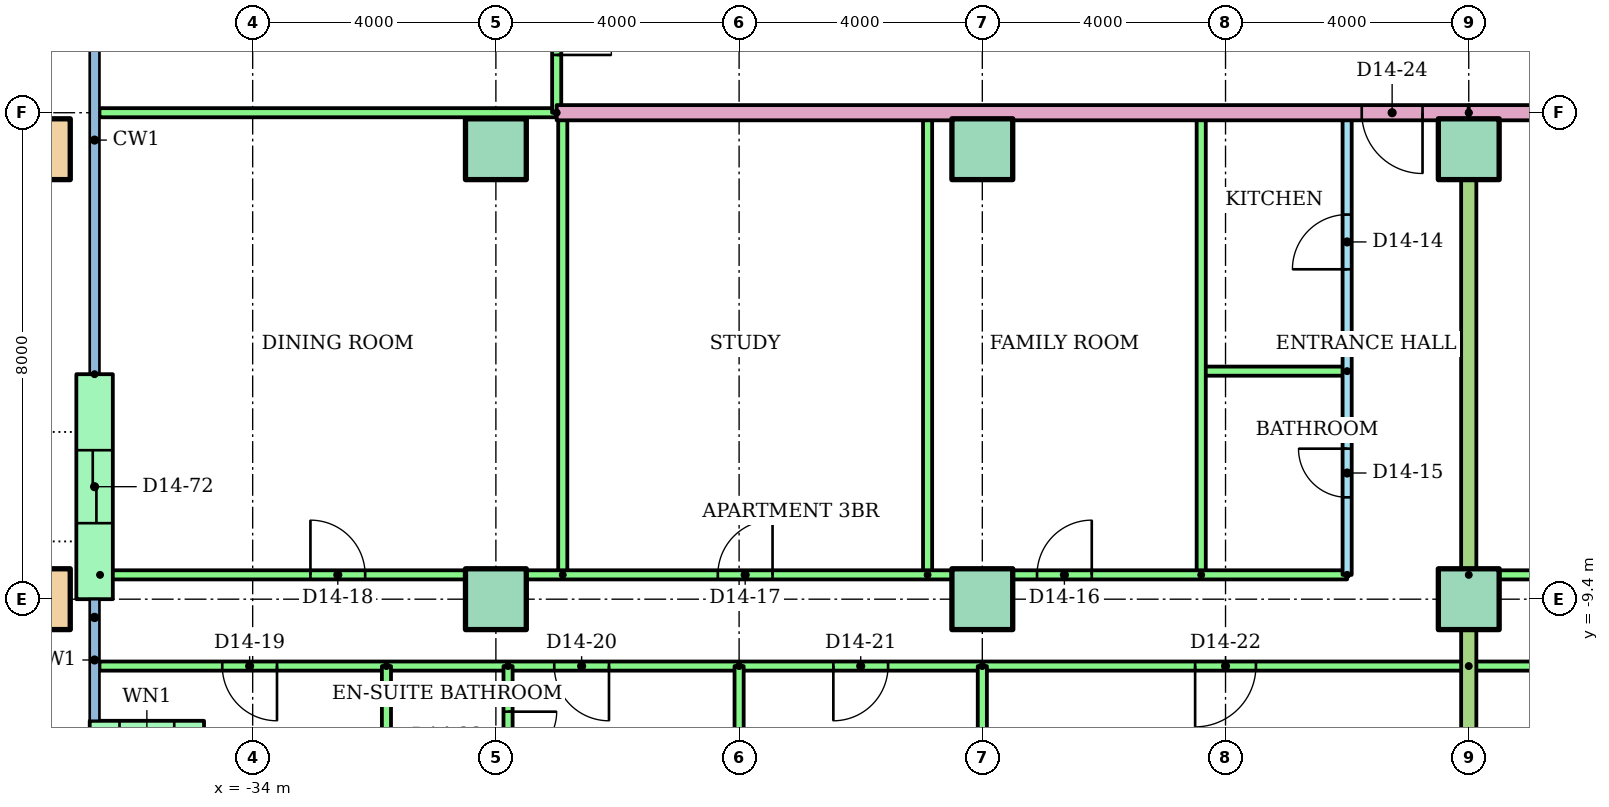
"""IFC4 building model, lengths in metres.
Left out: names, types, materials, properties, quantities, classifications, styles, units other than length and angle.
Written with IfcOpenShell. Run it as: python <this file> out.ifc"""

import sys

from ifc_helpers import new_model, si_unit, direction, frame, frame_2d, origin, origin_2d, place, context, subcontext, project, spatial, rectangle, hollow_rectangle, extrude, element, fill, save


model = new_model("IFC4")
c1 = context("Model", 3, precision=1e-05, world=origin(), true_north=direction((0.0, 1.0)))
c2 = subcontext(c1, "Body", "Model", "MODEL_VIEW")
j1 = project(units=[si_unit("LENGTHUNIT", "METRE"), si_unit("PLANEANGLEUNIT", "RADIAN")], contexts=[c1])
p1 = place(None, origin())
s1 = spatial("IfcSite", under=j1, at=p1, CompositionType="ELEMENT")
p2 = place(p1, origin())
s2 = spatial("IfcBuilding", under=s1, at=p2, CompositionType="ELEMENT")
p3 = place(p2, frame((0.0, 0.0, 54.4)))
s3 = spatial("IfcBuildingStorey", under=s2, at=p3, CompositionType="ELEMENT", Elevation=54.4)
p4 = place(p3, frame((-37.5, -9.4, 0.0)))
e1 = element("IfcColumn", 1, at=p4, inside=s3, PredefinedType="COLUMN", context=c2, shape_type="SweptSolid", body=[
    extrude(hollow_rectangle(XDim=1.0, YDim=1.0, WallThickness=0.05, at=origin_2d()), origin(), (0.0, 0.0, 1.0), 3.2),
])
for number, where in (
    (2, (-30.0, -9.4, 0.0)),
    (3, (-22.0, -9.4, 0.0)),
    (4, (-14.0, -9.4, 0.0)),
):
    element("IfcColumn", number, at=place(p3, frame(where)), inside=s3, PredefinedType="COLUMN", context=c2, shape_type="SweptSolid", body=[
        extrude(rectangle(XDim=1.0, YDim=1.0, at=origin_2d()), origin(), (0.0, 0.0, 1.0), 3.2),
    ])
p5 = place(p3, frame((-37.5, -2.0, 0.0)))
e5 = element("IfcColumn", 5, at=p5, inside=s3, PredefinedType="COLUMN", context=c2, shape_type="SweptSolid", body=[
    extrude(hollow_rectangle(XDim=1.0, YDim=1.0, WallThickness=0.05, at=origin_2d()), origin(), (0.0, 0.0, 1.0), 3.2),
])
for number, where in (
    (6, (-30.0, -2.0, 0.0)),
    (7, (-22.0, -2.0, 0.0)),
    (8, (-14.0, -2.0, 0.0)),
):
    element("IfcColumn", number, at=place(p3, frame(where)), inside=s3, PredefinedType="COLUMN", context=c2, shape_type="SweptSolid", body=[
        extrude(rectangle(XDim=1.0, YDim=1.0, at=origin_2d()), origin(), (0.0, 0.0, 1.0), 3.2),
    ])
p6 = place(p3, frame((-36.6, -5.7, 0.0), z_axis=(0.0, 0.0, 1.0), x_axis=(0.0, -1.0, 0.0)))
e9 = element("IfcWall", 9, at=p6, inside=s3, PredefinedType="STANDARD", context=c2, shape_type="SweptSolid", body=[
    extrude(rectangle(XDim=3.7, YDim=0.6, at=frame_2d((1.85, 0.0))), origin(), (0.0, 0.0, 1.0), 2.92),
])
p7 = place(p6, frame((1.25, 0.0, 0.0)))
e10 = element("IfcOpeningElement", 10, at=p7, cuts=e9, PredefinedType="OPENING", context=c2, shape_type="SweptSolid", body=[
    extrude(rectangle(XDim=1.2, YDim=2.1, at=frame_2d((0.6, 1.05))), frame((0.0, 0.31, 0.0), z_axis=(0.0, -1.0, 0.0), x_axis=(1.0, 0.0, 0.0)), (0.0, 0.0, 1.0), 0.62),
])
p8 = place(p3, frame((-36.68, -11.7, 0.0)))
e11 = element("IfcWall", 11, at=p8, inside=s3, PredefinedType="STANDARD", context=c2, shape_type="SweptSolid", body=[
    extrude(rectangle(XDim=1.88, YDim=0.6, at=frame_2d((0.94, 0.0))), origin(), (0.0, 0.0, 1.0), 2.92),
])
p9 = place(p8, frame((0.49, 0.0, 0.9)))
e12 = element("IfcOpeningElement", 12, at=p9, cuts=e11, PredefinedType="OPENING", context=c2, shape_type="SweptSolid", body=[
    extrude(rectangle(XDim=0.9, YDim=1.5, at=frame_2d((0.45, 0.75))), frame((0.0, 0.31, 0.0), z_axis=(0.0, -1.0, 0.0), x_axis=(1.0, 0.0, 0.0)), (0.0, 0.0, 1.0), 0.62),
])
p10 = place(p3, frame((-16.0, -9.0, 0.0), z_axis=(0.0, 0.0, 1.0), x_axis=(0.0, 1.0, 0.0)))
e13 = element("IfcWall", 13, at=p10, inside=s3, PredefinedType="PARTITIONING", context=c2, shape_type="SweptSolid", body=[
    extrude(rectangle(XDim=7.6, YDim=0.15, at=frame_2d((3.8, 0.0))), origin(), (0.0, 0.0, 1.0), 2.4),
])
p11 = place(p10, frame((5.025, 0.0, 0.0)))
e14 = element("IfcOpeningElement", 14, at=p11, cuts=e13, PredefinedType="OPENING", context=c2, shape_type="SweptSolid", body=[
    extrude(rectangle(XDim=0.9, YDim=2.1, at=frame_2d((0.45, 1.05))), frame((0.0, 0.085, 0.0), z_axis=(0.0, -1.0, 0.0), x_axis=(1.0, 0.0, 0.0)), (0.0, 0.0, 1.0), 0.17),
])
p12 = place(p10, frame((1.275, 0.0, 0.0)))
e15 = element("IfcOpeningElement", 15, at=p12, cuts=e13, PredefinedType="OPENING", context=c2, shape_type="SweptSolid", body=[
    extrude(rectangle(XDim=0.8, YDim=2.1, at=frame_2d((0.4, 1.05))), frame((0.0, 0.085, 0.0), z_axis=(0.0, -1.0, 0.0), x_axis=(1.0, 0.0, 0.0)), (0.0, 0.0, 1.0), 0.17),
])
p13 = place(p3, frame((-16.0, -5.65, 0.0), z_axis=(0.0, 0.0, 1.0), x_axis=(-1.0, 0.0, 0.0)))
e16 = element("IfcWall", 16, at=p13, inside=s3, PredefinedType="PARTITIONING", context=c2, shape_type="SweptSolid", body=[
    extrude(rectangle(XDim=2.4, YDim=0.15, at=frame_2d((1.2, 0.0))), origin(), (0.0, 0.0, 1.0), 2.4),
])
for number, where, z_axis, x_axis in (
    (17, (-18.4, -9.0, 0.0), (0.0, 0.0, 1.0), (0.0, 1.0, 0.0)),
    (18, (-22.9, -9.0, 0.0), (0.0, 0.0, 1.0), (0.0, 1.0, 0.0)),
    (19, (-28.9, -9.0, 0.0), (0.0, 0.0, 1.0), (0.0, 1.0, 0.0)),
):
    element("IfcWall", number, at=place(p3, frame(where, z_axis=z_axis, x_axis=x_axis)), inside=s3, PredefinedType="PARTITIONING", context=c2, shape_type="SweptSolid", body=[
        extrude(rectangle(XDim=7.6, YDim=0.15, at=frame_2d((3.8, 0.0))), origin(), (0.0, 0.0, 1.0), 2.4),
    ])
p14 = place(p3, frame((-36.51, -9.0, 0.0)))
e20 = element("IfcWall", 20, at=p14, inside=s3, PredefinedType="PARTITIONING", context=c2, shape_type="SweptSolid", body=[
    extrude(rectangle(XDim=20.51, YDim=0.15, at=frame_2d((10.255, 0.0))), origin(), (0.0, 0.0, 1.0), 2.4),
])
p15 = place(p14, frame((15.41, 0.0, 0.0)))
e21 = element("IfcOpeningElement", 21, at=p15, cuts=e20, PredefinedType="OPENING", context=c2, shape_type="SweptSolid", body=[
    extrude(rectangle(XDim=0.9, YDim=2.1, at=frame_2d((0.45, 1.05))), frame((0.0, 0.085, 0.0), z_axis=(0.0, -1.0, 0.0), x_axis=(1.0, 0.0, 0.0)), (0.0, 0.0, 1.0), 0.17),
])
p16 = place(p14, frame((10.16, 0.0, 0.0)))
e22 = element("IfcOpeningElement", 22, at=p16, cuts=e20, PredefinedType="OPENING", context=c2, shape_type="SweptSolid", body=[
    extrude(rectangle(XDim=0.9, YDim=2.1, at=frame_2d((0.45, 1.05))), frame((0.0, 0.085, 0.0), z_axis=(0.0, -1.0, 0.0), x_axis=(1.0, 0.0, 0.0)), (0.0, 0.0, 1.0), 0.17),
])
p17 = place(p14, frame((3.46, 0.0, 0.0)))
e23 = element("IfcOpeningElement", 23, at=p17, cuts=e20, PredefinedType="OPENING", context=c2, shape_type="SweptSolid", body=[
    extrude(rectangle(XDim=0.9, YDim=2.1, at=frame_2d((0.45, 1.05))), frame((0.0, 0.085, 0.0), z_axis=(0.0, -1.0, 0.0), x_axis=(1.0, 0.0, 0.0)), (0.0, 0.0, 1.0), 0.17),
])
p18 = place(p3, frame((-14.0, -10.5, 0.0), z_axis=(0.0, 0.0, 1.0), x_axis=(-1.0, 0.0, 0.0)))
e24 = element("IfcWall", 24, at=p18, inside=s3, PredefinedType="PARTITIONING", context=c2, shape_type="SweptSolid", body=[
    extrude(rectangle(XDim=22.52, YDim=0.15, at=frame_2d((11.26, 0.0))), origin(), (0.0, 0.0, 1.0), 2.4),
])
p19 = place(p18, frame((19.6, 0.0, 0.0)))
e25 = element("IfcOpeningElement", 25, at=p19, cuts=e24, PredefinedType="OPENING", context=c2, shape_type="SweptSolid", body=[
    extrude(rectangle(XDim=0.9, YDim=2.1, at=frame_2d((0.45, 1.05))), frame((0.0, 0.085, 0.0), z_axis=(0.0, -1.0, 0.0), x_axis=(1.0, 0.0, 0.0)), (0.0, 0.0, 1.0), 0.17),
])
p20 = place(p18, frame((14.14, 0.0, 0.0)))
e26 = element("IfcOpeningElement", 26, at=p20, cuts=e24, PredefinedType="OPENING", context=c2, shape_type="SweptSolid", body=[
    extrude(rectangle(XDim=0.9, YDim=2.1, at=frame_2d((0.45, 1.05))), frame((0.0, 0.085, 0.0), z_axis=(0.0, -1.0, 0.0), x_axis=(1.0, 0.0, 0.0)), (0.0, 0.0, 1.0), 0.17),
])
p21 = place(p18, frame((9.55, 0.0, 0.0)))
e27 = element("IfcOpeningElement", 27, at=p21, cuts=e24, PredefinedType="OPENING", context=c2, shape_type="SweptSolid", body=[
    extrude(rectangle(XDim=0.9, YDim=2.1, at=frame_2d((0.45, 1.05))), frame((0.0, 0.085, 0.0), z_axis=(0.0, -1.0, 0.0), x_axis=(1.0, 0.0, 0.0)), (0.0, 0.0, 1.0), 0.17),
])
p22 = place(p18, frame((3.5, 0.0, 0.0)))
e28 = element("IfcOpeningElement", 28, at=p22, cuts=e24, PredefinedType="OPENING", context=c2, shape_type="SweptSolid", body=[
    extrude(rectangle(XDim=1.0, YDim=2.1, at=frame_2d((0.5, 1.05))), frame((0.0, 0.085, 0.0), z_axis=(0.0, -1.0, 0.0), x_axis=(1.0, 0.0, 0.0)), (0.0, 0.0, 1.0), 0.17),
])
p23 = place(p3, frame((-31.8, -10.5, 0.0), z_axis=(0.0, 0.0, 1.0), x_axis=(0.0, -1.0, 0.0)))
e29 = element("IfcWall", 29, at=p23, inside=s3, PredefinedType="PARTITIONING", context=c2, shape_type="SweptSolid", body=[
    extrude(rectangle(XDim=3.82, YDim=0.15, at=frame_2d((1.91, 0.0))), origin(), (0.0, 0.0, 1.0), 2.4),
])
p24 = place(p3, frame((-26.0, -10.5, 0.0), z_axis=(0.0, 0.0, 1.0), x_axis=(0.0, -1.0, 0.0)))
e30 = element("IfcWall", 30, at=p24, inside=s3, PredefinedType="PARTITIONING", context=c2, shape_type="SweptSolid", body=[
    extrude(rectangle(XDim=5.621, YDim=0.15, at=frame_2d((2.811, 0.0))), origin(), (0.0, 0.0, 1.0), 2.4),
])
p25 = place(p3, frame((-22.0, -10.5, 0.0), z_axis=(0.0, 0.0, 1.0), x_axis=(0.0, -1.0, 0.0)))
e31 = element("IfcWall", 31, at=p25, inside=s3, PredefinedType="PARTITIONING", context=c2, shape_type="SweptSolid", body=[
    extrude(rectangle(XDim=5.61, YDim=0.15, at=frame_2d((2.805, 0.0))), origin(), (0.0, 0.0, 1.0), 2.4),
])
p26 = place(p3, frame((-29.8, -10.5, 0.0), z_axis=(0.0, 0.0, 1.0), x_axis=(0.0, -1.0, 0.0)))
e32 = element("IfcWall", 32, at=p26, inside=s3, PredefinedType="PARTITIONING", context=c2, shape_type="SweptSolid", body=[
    extrude(rectangle(XDim=2.3, YDim=0.15, at=frame_2d((1.15, 0.0))), origin(), (0.0, 0.0, 1.0), 2.4),
])
p27 = place(p26, frame((0.75, 0.0, 0.0)))
e33 = element("IfcOpeningElement", 33, at=p27, cuts=e32, PredefinedType="OPENING", context=c2, shape_type="SweptSolid", body=[
    extrude(rectangle(XDim=0.8, YDim=2.1, at=frame_2d((0.4, 1.05))), frame((0.0, 0.085, 0.0), z_axis=(0.0, -1.0, 0.0), x_axis=(1.0, 0.0, 0.0)), (0.0, 0.0, 1.0), 0.17),
])
p28 = place(p3, frame((-14.0, -9.0, 0.0)))
e34 = element("IfcWall", 34, at=p28, inside=s3, PredefinedType="PARTITIONING", context=c2, shape_type="SweptSolid", body=[
    extrude(rectangle(XDim=22.0, YDim=0.15, at=frame_2d((11.0, 0.0))), origin(), (0.0, 0.0, 1.0), 2.4),
])
p29 = place(p28, frame((16.76, 0.0, 0.0)))
e35 = element("IfcOpeningElement", 35, at=p29, cuts=e34, PredefinedType="OPENING", context=c2, shape_type="SweptSolid", body=[
    extrude(rectangle(XDim=0.9, YDim=2.1, at=frame_2d((0.45, 1.05))), frame((0.0, 0.085, 0.0), z_axis=(0.0, -1.0, 0.0), x_axis=(1.0, 0.0, 0.0)), (0.0, 0.0, 1.0), 0.17),
])
p30 = place(p28, frame((10.9, 0.0, 0.0)))
e36 = element("IfcOpeningElement", 36, at=p30, cuts=e34, PredefinedType="OPENING", context=c2, shape_type="SweptSolid", body=[
    extrude(rectangle(XDim=0.9, YDim=2.1, at=frame_2d((0.45, 1.05))), frame((0.0, 0.085, 0.0), z_axis=(0.0, -1.0, 0.0), x_axis=(1.0, 0.0, 0.0)), (0.0, 0.0, 1.0), 0.17),
])
p31 = place(p28, frame((3.6, 0.0, 0.0)))
e37 = element("IfcOpeningElement", 37, at=p31, cuts=e34, PredefinedType="OPENING", context=c2, shape_type="SweptSolid", body=[
    extrude(rectangle(XDim=0.9, YDim=2.1, at=frame_2d((0.45, 1.05))), frame((0.0, 0.085, 0.0), z_axis=(0.0, -1.0, 0.0), x_axis=(1.0, 0.0, 0.0)), (0.0, 0.0, 1.0), 0.17),
])
p32 = place(p3, frame((10.0, -10.5, 0.0), z_axis=(0.0, 0.0, 1.0), x_axis=(-1.0, 0.0, 0.0)))
e38 = element("IfcWall", 38, at=p32, inside=s3, PredefinedType="PARTITIONING", context=c2, shape_type="SweptSolid", body=[
    extrude(rectangle(XDim=24.0, YDim=0.15, at=frame_2d((12.0, 0.0))), origin(), (0.0, 0.0, 1.0), 2.4),
])
p33 = place(p32, frame((19.5, 0.0, 0.0)))
e39 = element("IfcOpeningElement", 39, at=p33, cuts=e38, PredefinedType="OPENING", context=c2, shape_type="SweptSolid", body=[
    extrude(rectangle(XDim=1.0, YDim=2.1, at=frame_2d((0.5, 1.05))), frame((0.0, 0.085, 0.0), z_axis=(0.0, -1.0, 0.0), x_axis=(1.0, 0.0, 0.0)), (0.0, 0.0, 1.0), 0.17),
])
p34 = place(p32, frame((13.55, 0.0, 0.0)))
e40 = element("IfcOpeningElement", 40, at=p34, cuts=e38, PredefinedType="OPENING", context=c2, shape_type="SweptSolid", body=[
    extrude(rectangle(XDim=0.9, YDim=2.1, at=frame_2d((0.45, 1.05))), frame((0.0, 0.085, 0.0), z_axis=(0.0, -1.0, 0.0), x_axis=(1.0, 0.0, 0.0)), (0.0, 0.0, 1.0), 0.17),
])
p35 = place(p32, frame((9.55, 0.0, 0.0)))
e41 = element("IfcOpeningElement", 41, at=p35, cuts=e38, PredefinedType="OPENING", context=c2, shape_type="SweptSolid", body=[
    extrude(rectangle(XDim=0.9, YDim=2.1, at=frame_2d((0.45, 1.05))), frame((0.0, 0.085, 0.0), z_axis=(0.0, -1.0, 0.0), x_axis=(1.0, 0.0, 0.0)), (0.0, 0.0, 1.0), 0.17),
])
p36 = place(p32, frame((5.55, 0.0, 0.0)))
e42 = element("IfcOpeningElement", 42, at=p36, cuts=e38, PredefinedType="OPENING", context=c2, shape_type="SweptSolid", body=[
    extrude(rectangle(XDim=0.9, YDim=2.1, at=frame_2d((0.45, 1.05))), frame((0.0, 0.085, 0.0), z_axis=(0.0, -1.0, 0.0), x_axis=(1.0, 0.0, 0.0)), (0.0, 0.0, 1.0), 0.17),
])
p37 = place(p32, frame((1.55, 0.0, 0.0)))
e43 = element("IfcOpeningElement", 43, at=p37, cuts=e38, PredefinedType="OPENING", context=c2, shape_type="SweptSolid", body=[
    extrude(rectangle(XDim=0.9, YDim=2.1, at=frame_2d((0.45, 1.05))), frame((0.0, 0.085, 0.0), z_axis=(0.0, -1.0, 0.0), x_axis=(1.0, 0.0, 0.0)), (0.0, 0.0, 1.0), 0.17),
])
p38 = place(p3, frame((-14.0, -1.4, 0.0), z_axis=(0.0, 0.0, 1.0), x_axis=(0.0, -1.0, 0.0)))
e44 = element("IfcWall", 44, at=p38, inside=s3, PredefinedType="PARTITIONING", context=c2, shape_type="SweptSolid", body=[
    extrude(rectangle(XDim=14.71, YDim=0.25, at=frame_2d((7.355, 0.0))), origin(), (0.0, 0.0, 1.0), 2.4),
])
p39 = place(p3, frame((-14.0, -1.4, 0.0), z_axis=(0.0, 0.0, 1.0), x_axis=(-1.0, 0.0, 0.0)))
e45 = element("IfcWall", 45, at=p39, inside=s3, PredefinedType="PARTITIONING", context=c2, shape_type="SweptSolid", body=[
    extrude(rectangle(XDim=15.0, YDim=0.25, at=frame_2d((7.5, 0.0))), origin(), (0.0, 0.0, 1.0), 2.4),
])
p40 = place(p39, frame((0.76, 0.0, 0.0)))
e46 = element("IfcOpeningElement", 46, at=p40, cuts=e45, PredefinedType="OPENING", context=c2, shape_type="SweptSolid", body=[
    extrude(rectangle(XDim=1.0, YDim=2.1, at=frame_2d((0.5, 1.05))), frame((0.0, 0.135, 0.0), z_axis=(0.0, -1.0, 0.0), x_axis=(1.0, 0.0, 0.0)), (0.0, 0.0, 1.0), 0.27),
])
p41 = place(p3, frame((-29.0, -1.4, 0.0), z_axis=(0.0, 0.0, 1.0), x_axis=(-1.0, 0.0, 0.0)))
e47 = element("IfcWall", 47, at=p41, inside=s3, PredefinedType="PARTITIONING", context=c2, shape_type="SweptSolid", body=[
    extrude(rectangle(XDim=7.52, YDim=0.15, at=frame_2d((3.76, 0.0))), origin(), (0.0, 0.0, 1.0), 2.4),
])
p42 = place(p3, frame((-29.0, 1.4, 0.0), z_axis=(0.0, 0.0, 1.0), x_axis=(0.0, -1.0, 0.0)))
e48 = element("IfcWall", 48, at=p42, inside=s3, PredefinedType="PARTITIONING", context=c2, shape_type="SweptSolid", body=[
    extrude(rectangle(XDim=2.8, YDim=0.15, at=frame_2d((1.4, 0.0))), origin(), (0.0, 0.0, 1.0), 2.4),
])
p43 = place(p42, frame((0.95, 0.0, 0.0)))
e49 = element("IfcOpeningElement", 49, at=p43, cuts=e48, PredefinedType="OPENING", context=c2, shape_type="SweptSolid", body=[
    extrude(rectangle(XDim=0.9, YDim=2.1, at=frame_2d((0.45, 1.05))), frame((0.0, 0.085, 0.0), z_axis=(0.0, -1.0, 0.0), x_axis=(1.0, 0.0, 0.0)), (0.0, 0.0, 1.0), 0.17),
])
p44 = place(p3, frame((14.0, -1.4, 0.0), z_axis=(0.0, 0.0, 1.0), x_axis=(-1.0, 0.0, 0.0)))
e50 = element("IfcWall", 50, at=p44, inside=s3, PredefinedType="PARTITIONING", context=c2, shape_type="SweptSolid", body=[
    extrude(rectangle(XDim=28.0, YDim=0.25, at=frame_2d((14.0, 0.0))), origin(), (0.0, 0.0, 1.0), 2.4),
])
p45 = place(p44, frame((4.76, 0.0, 0.0)))
e51 = element("IfcOpeningElement", 51, at=p45, cuts=e50, PredefinedType="OPENING", context=c2, shape_type="SweptSolid", body=[
    extrude(rectangle(XDim=1.0, YDim=2.1, at=frame_2d((0.5, 1.05))), frame((0.0, 0.135, 0.0), z_axis=(0.0, -1.0, 0.0), x_axis=(1.0, 0.0, 0.0)), (0.0, 0.0, 1.0), 0.27),
])
p46 = place(p44, frame((2.24, 0.0, 0.0)))
e52 = element("IfcOpeningElement", 52, at=p46, cuts=e50, PredefinedType="OPENING", context=c2, shape_type="SweptSolid", body=[
    extrude(rectangle(XDim=1.0, YDim=2.1, at=frame_2d((0.5, 1.05))), frame((0.0, 0.135, 0.0), z_axis=(0.0, -1.0, 0.0), x_axis=(1.0, 0.0, 0.0)), (0.0, 0.0, 1.0), 0.27),
])
p47 = place(p11, origin())
e53 = element("IfcDoor", 53, at=p47, inside=s3, OperationType="SINGLE_SWING_LEFT", PredefinedType="DOOR", context=c2, shape_type="SweptSolid", body=[
    extrude(rectangle(XDim=0.9, YDim=2.1, at=frame_2d((0.45, 1.05))), frame((0.0, 0.025, 0.0), z_axis=(0.0, -1.0, 0.0), x_axis=(1.0, 0.0, 0.0)), (0.0, 0.0, 1.0), 0.05),
])
fill(e14, e53)
p48 = place(p12, origin())
e54 = element("IfcDoor", 54, at=p48, inside=s3, OperationType="SINGLE_SWING_RIGHT", PredefinedType="DOOR", context=c2, shape_type="SweptSolid", body=[
    extrude(rectangle(XDim=0.8, YDim=2.1, at=frame_2d((0.4, 1.05))), frame((0.0, 0.025, 0.0), z_axis=(0.0, -1.0, 0.0), x_axis=(1.0, 0.0, 0.0)), (0.0, 0.0, 1.0), 0.05),
])
fill(e15, e54)
p49 = place(p15, origin())
e55 = element("IfcDoor", 55, at=p49, inside=s3, OperationType="SINGLE_SWING_RIGHT", PredefinedType="DOOR", context=c2, shape_type="SweptSolid", body=[
    extrude(rectangle(XDim=0.9, YDim=2.1, at=frame_2d((0.45, 1.05))), frame((0.0, 0.025, 0.0), z_axis=(0.0, -1.0, 0.0), x_axis=(1.0, 0.0, 0.0)), (0.0, 0.0, 1.0), 0.05),
])
fill(e21, e55)
p50 = place(p16, origin())
e56 = element("IfcDoor", 56, at=p50, inside=s3, OperationType="SINGLE_SWING_RIGHT", PredefinedType="DOOR", context=c2, shape_type="SweptSolid", body=[
    extrude(rectangle(XDim=0.9, YDim=2.1, at=frame_2d((0.45, 1.05))), frame((0.0, 0.025, 0.0), z_axis=(0.0, -1.0, 0.0), x_axis=(1.0, 0.0, 0.0)), (0.0, 0.0, 1.0), 0.05),
])
fill(e22, e56)
p51 = place(p17, origin())
e57 = element("IfcDoor", 57, at=p51, inside=s3, OperationType="SINGLE_SWING_LEFT", PredefinedType="DOOR", context=c2, shape_type="SweptSolid", body=[
    extrude(rectangle(XDim=0.9, YDim=2.1, at=frame_2d((0.45, 1.05))), frame((0.0, 0.025, 0.0), z_axis=(0.0, -1.0, 0.0), x_axis=(1.0, 0.0, 0.0)), (0.0, 0.0, 1.0), 0.05),
])
fill(e23, e57)
p52 = place(p19, origin())
e58 = element("IfcDoor", 58, at=p52, inside=s3, OperationType="SINGLE_SWING_LEFT", PredefinedType="DOOR", context=c2, shape_type="SweptSolid", body=[
    extrude(rectangle(XDim=0.9, YDim=2.1, at=frame_2d((0.45, 1.05))), frame((0.0, 0.025, 0.0), z_axis=(0.0, -1.0, 0.0), x_axis=(1.0, 0.0, 0.0)), (0.0, 0.0, 1.0), 0.05),
])
fill(e25, e58)
p53 = place(p20, origin())
e59 = element("IfcDoor", 59, at=p53, inside=s3, OperationType="SINGLE_SWING_LEFT", PredefinedType="DOOR", context=c2, shape_type="SweptSolid", body=[
    extrude(rectangle(XDim=0.9, YDim=2.1, at=frame_2d((0.45, 1.05))), frame((0.0, 0.025, 0.0), z_axis=(0.0, -1.0, 0.0), x_axis=(1.0, 0.0, 0.0)), (0.0, 0.0, 1.0), 0.05),
])
fill(e26, e59)
p54 = place(p21, origin())
e60 = element("IfcDoor", 60, at=p54, inside=s3, OperationType="SINGLE_SWING_RIGHT", PredefinedType="DOOR", context=c2, shape_type="SweptSolid", body=[
    extrude(rectangle(XDim=0.9, YDim=2.1, at=frame_2d((0.45, 1.05))), frame((0.0, 0.025, 0.0), z_axis=(0.0, -1.0, 0.0), x_axis=(1.0, 0.0, 0.0)), (0.0, 0.0, 1.0), 0.05),
])
fill(e27, e60)
p55 = place(p22, origin())
e61 = element("IfcDoor", 61, at=p55, inside=s3, OperationType="SINGLE_SWING_RIGHT", PredefinedType="DOOR", context=c2, shape_type="SweptSolid", body=[
    extrude(rectangle(XDim=1.0, YDim=2.1, at=frame_2d((0.5, 1.05))), frame((0.0, 0.025, 0.0), z_axis=(0.0, -1.0, 0.0), x_axis=(1.0, 0.0, 0.0)), (0.0, 0.0, 1.0), 0.05),
])
fill(e28, e61)
p56 = place(p27, origin())
e62 = element("IfcDoor", 62, at=p56, inside=s3, OperationType="SINGLE_SWING_LEFT", PredefinedType="DOOR", context=c2, shape_type="SweptSolid", body=[
    extrude(rectangle(XDim=0.8, YDim=2.1, at=frame_2d((0.4, 1.05))), frame((0.0, 0.025, 0.0), z_axis=(0.0, -1.0, 0.0), x_axis=(1.0, 0.0, 0.0)), (0.0, 0.0, 1.0), 0.05),
])
fill(e33, e62)
p57 = place(p40, origin())
e63 = element("IfcDoor", 63, at=p57, inside=s3, OperationType="SINGLE_SWING_LEFT", PredefinedType="DOOR", context=c2, shape_type="SweptSolid", body=[
    extrude(rectangle(XDim=1.0, YDim=2.1, at=frame_2d((0.5, 1.05))), frame((0.0, 0.025, 0.0), z_axis=(0.0, -1.0, 0.0), x_axis=(1.0, 0.0, 0.0)), (0.0, 0.0, 1.0), 0.05),
])
fill(e46, e63)
p58 = place(p43, origin())
e64 = element("IfcDoor", 64, at=p58, inside=s3, OperationType="SINGLE_SWING_RIGHT", PredefinedType="DOOR", context=c2, shape_type="SweptSolid", body=[
    extrude(rectangle(XDim=0.9, YDim=2.1, at=frame_2d((0.45, 1.05))), frame((0.0, 0.025, 0.0), z_axis=(0.0, -1.0, 0.0), x_axis=(1.0, 0.0, 0.0)), (0.0, 0.0, 1.0), 0.05),
])
fill(e49, e64)
p59 = place(p7, origin())
e65 = element("IfcDoor", 65, at=p59, inside=s3, OperationType="SLIDING_TO_LEFT", PredefinedType="DOOR", context=c2, shape_type="SweptSolid", body=[
    extrude(rectangle(XDim=1.2, YDim=2.1, at=frame_2d((0.6, 1.05))), frame((0.0, 0.025, 0.0), z_axis=(0.0, -1.0, 0.0), x_axis=(1.0, 0.0, 0.0)), (0.0, 0.0, 1.0), 0.05),
])
fill(e10, e65)
save(model, sys.argv[1])
